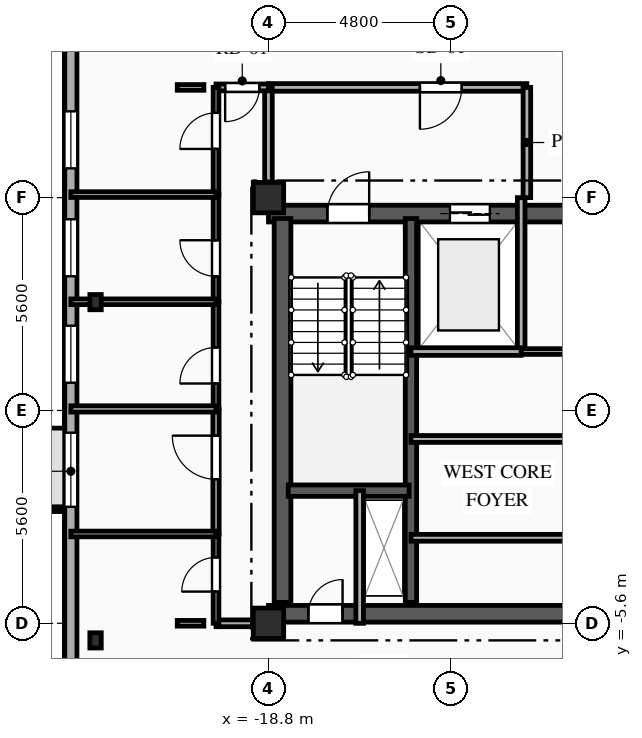
"""IFC4 building model, lengths in metres.
Left out: names, types, materials, properties, quantities, classifications, styles, units other than length and angle.
Written with IfcOpenShell. Run it as: python <this file> out.ifc"""

import sys

from ifc_helpers import new_model, si_unit, direction, frame, frame_2d, origin, origin_2d, place, context, subcontext, project, spatial, rectangle, i_section, extrude, element, fill, save


model = new_model("IFC4")
c1 = context("Model", 3, precision=1e-05, world=origin(), true_north=direction((0.0, 1.0)))
c2 = subcontext(c1, "Body", "Model", "MODEL_VIEW")
j1 = project(units=[si_unit("LENGTHUNIT", "METRE"), si_unit("PLANEANGLEUNIT", "RADIAN")], contexts=[c1])
p1 = place(None, origin())
s1 = spatial("IfcSite", under=j1, at=p1, CompositionType="ELEMENT")
p2 = place(p1, origin())
s2 = spatial("IfcBuilding", under=s1, at=p2, CompositionType="ELEMENT")
p3 = place(p2, frame((0.0, 0.0, 241.7)))
s3 = spatial("IfcBuildingStorey", under=s2, at=p3, CompositionType="ELEMENT", Elevation=241.7)
for number, where, z_axis, x_axis in (
    (1, (-18.8, -5.6, 0.0), (0.0, 0.0, 1.0), (1.0, 0.0, 0.0)),
    (2, (-18.8, 5.6, 0.0), (0.0, 0.0, 1.0), (1.0, 0.0, 0.0)),
):
    element("IfcColumn", number, at=place(p3, frame(where, z_axis=z_axis, x_axis=x_axis)), inside=s3, PredefinedType="COLUMN", context=c2, shape_type="SweptSolid", body=[
        extrude(rectangle(XDim=0.8, YDim=0.8, at=origin_2d()), origin(), (0.0, 0.0, 1.0), 3.35),
    ])
for number, where, z_axis, x_axis in (
    (3, (-23.35, 2.85, 0.0), (0.0, 0.0, 1.0), (1.0, 0.0, 0.0)),
    (4, (-23.35, -6.05, 0.0), (0.0, 0.0, 1.0), (1.0, 0.0, 0.0)),
):
    element("IfcColumn", number, at=place(p3, frame(where, z_axis=z_axis, x_axis=x_axis)), inside=s3, PredefinedType="COLUMN", context=c2, shape_type="SweptSolid", body=[
        extrude(i_section(OverallWidth=0.3, OverallDepth=0.4, WebThickness=0.013, FlangeThickness=0.024, FilletRadius=0.027, at=origin_2d()), origin(), (0.0, 0.0, 1.0), 3.35),
    ])
p4 = place(p3, frame((-24.0, -15.6, 0.0), z_axis=(0.0, 0.0, 1.0), x_axis=(0.0, 1.0, 0.0)))
e5 = element("IfcWall", 5, at=p4, inside=s3, PredefinedType="SOLIDWALL", context=c2, shape_type="SweptSolid", body=[
    extrude(rectangle(XDim=28.0, YDim=0.32, at=frame_2d((14.0, 0.0))), origin(), (0.0, 0.0, 1.0), 3.04),
])
p5 = place(p4, frame((13.065, 0.0, 0.85)))
e6 = element("IfcOpeningElement", 6, at=p5, cuts=e5, PredefinedType="OPENING", context=c2, shape_type="SweptSolid", body=[
    extrude(rectangle(XDim=1.95, YDim=1.85, at=frame_2d((0.975, 0.925))), frame((0.0, 0.17, 0.0), z_axis=(0.0, -1.0, 0.0), x_axis=(1.0, 0.0, 0.0)), (0.0, 0.0, 1.0), 0.34),
])
p6 = place(p4, frame((16.33, 0.0, 0.85)))
e7 = element("IfcOpeningElement", 7, at=p6, cuts=e5, PredefinedType="OPENING", context=c2, shape_type="SweptSolid", body=[
    extrude(rectangle(XDim=1.5, YDim=1.85, at=frame_2d((0.75, 0.925))), frame((0.0, 0.17, 0.0), z_axis=(0.0, -1.0, 0.0), x_axis=(1.0, 0.0, 0.0)), (0.0, 0.0, 1.0), 0.34),
])
p7 = place(p4, frame((19.13, 0.0, 0.85)))
e8 = element("IfcOpeningElement", 8, at=p7, cuts=e5, PredefinedType="OPENING", context=c2, shape_type="SweptSolid", body=[
    extrude(rectangle(XDim=1.5, YDim=1.85, at=frame_2d((0.75, 0.925))), frame((0.0, 0.17, 0.0), z_axis=(0.0, -1.0, 0.0), x_axis=(1.0, 0.0, 0.0)), (0.0, 0.0, 1.0), 0.34),
])
p8 = place(p4, frame((21.97, 0.0, 0.85)))
e9 = element("IfcOpeningElement", 9, at=p8, cuts=e5, PredefinedType="OPENING", context=c2, shape_type="SweptSolid", body=[
    extrude(rectangle(XDim=1.5, YDim=1.85, at=frame_2d((0.75, 0.925))), frame((0.0, 0.17, 0.0), z_axis=(0.0, -1.0, 0.0), x_axis=(1.0, 0.0, 0.0)), (0.0, 0.0, 1.0), 0.34),
])
p9 = place(p3, frame((-18.8, 5.18, 0.0), z_axis=(0.0, 0.0, 1.0), x_axis=(1.0, 0.0, 0.0)))
e10 = element("IfcWall", 10, at=p9, inside=s3, PredefinedType="SHEAR", context=c2, shape_type="SweptSolid", body=[
    extrude(rectangle(XDim=9.6, YDim=0.44, at=frame_2d((4.8, 0.0))), origin(), (0.0, 0.0, 1.0), 3.04),
])
p10 = place(p9, frame((1.55, 0.0, 0.0)))
e11 = element("IfcOpeningElement", 11, at=p10, cuts=e10, PredefinedType="OPENING", context=c2, shape_type="SweptSolid", body=[
    extrude(rectangle(XDim=1.1, YDim=2.15, at=frame_2d((0.55, 1.075))), frame((0.0, 0.23, 0.0), z_axis=(0.0, -1.0, 0.0), x_axis=(1.0, 0.0, 0.0)), (0.0, 0.0, 1.0), 0.46),
])
p11 = place(p9, frame((4.775, 0.0, 0.0)))
e12 = element("IfcOpeningElement", 12, at=p11, cuts=e10, PredefinedType="OPENING", context=c2, shape_type="SweptSolid", body=[
    extrude(rectangle(XDim=1.05, YDim=2.1, at=frame_2d((0.525, 1.05))), frame((0.0, 0.23, 0.0), z_axis=(0.0, -1.0, 0.0), x_axis=(1.0, 0.0, 0.0)), (0.0, 0.0, 1.0), 0.46),
])
p12 = place(p3, frame((-18.8, -5.35, 0.0), z_axis=(0.0, 0.0, 1.0), x_axis=(1.0, 0.0, 0.0)))
e13 = element("IfcWall", 13, at=p12, inside=s3, PredefinedType="SHEAR", context=c2, shape_type="SweptSolid", body=[
    extrude(rectangle(XDim=9.6, YDim=0.44, at=frame_2d((4.8, 0.0))), origin(), (0.0, 0.0, 1.0), 3.04),
])
p13 = place(p12, frame((1.05, 0.0, 0.0)))
e14 = element("IfcOpeningElement", 14, at=p13, cuts=e13, PredefinedType="OPENING", context=c2, shape_type="SweptSolid", body=[
    extrude(rectangle(XDim=0.9, YDim=2.1, at=frame_2d((0.45, 1.05))), frame((0.0, 0.23, 0.0), z_axis=(0.0, -1.0, 0.0), x_axis=(1.0, 0.0, 0.0)), (0.0, 0.0, 1.0), 0.46),
])
p14 = place(p3, frame((-18.43, -5.05, 0.0), z_axis=(0.0, 0.0, 1.0), x_axis=(0.0, 1.0, 0.0)))
e15 = element("IfcWall", 15, at=p14, inside=s3, PredefinedType="SHEAR", context=c2, shape_type="SweptSolid", body=[
    extrude(rectangle(XDim=10.1, YDim=0.44, at=frame_2d((5.05, 0.0))), origin(), (0.0, 0.0, 1.0), 3.04),
])
p15 = place(p3, frame((-15.05, -5.05, 0.0), z_axis=(0.0, 0.0, 1.0), x_axis=(0.0, 1.0, 0.0)))
e16 = element("IfcWall", 16, at=p15, inside=s3, PredefinedType="SHEAR", context=c2, shape_type="SweptSolid", body=[
    extrude(rectangle(XDim=10.1, YDim=0.3, at=frame_2d((5.05, 0.0))), origin(), (0.0, 0.0, 1.0), 3.04),
])
p16 = place(p3, frame((-18.28, -2.11, 0.0), z_axis=(0.0, 0.0, 1.0), x_axis=(1.0, 0.0, 0.0)))
e17 = element("IfcWall", 17, at=p16, inside=s3, PredefinedType="SHEAR", context=c2, shape_type="SweptSolid", body=[
    extrude(rectangle(XDim=3.18, YDim=0.3, at=frame_2d((1.59, 0.0))), origin(), (0.0, 0.0, 1.0), 3.04),
])
p17 = place(p3, frame((-16.4, -5.6, 0.0), z_axis=(0.0, 0.0, 1.0), x_axis=(0.0, 1.0, 0.0)))
e18 = element("IfcWall", 18, at=p17, inside=s3, PredefinedType="PARTITIONING", context=c2, shape_type="SweptSolid", body=[
    extrude(rectangle(XDim=3.49, YDim=0.2, at=frame_2d((1.745, 0.0))), origin(), (0.0, 0.0, 1.0), 3.04),
])
p18 = place(p3, frame((-12.15, 1.55, 0.0), z_axis=(0.0, 0.0, 1.0), x_axis=(0.0, 1.0, 0.0)))
e19 = element("IfcWall", 19, at=p18, inside=s3, PredefinedType="PARTITIONING", context=c2, shape_type="SweptSolid", body=[
    extrude(rectangle(XDim=4.05, YDim=0.2, at=frame_2d((2.025, 0.0))), origin(), (0.0, 0.0, 1.0), 3.04),
])
p19 = place(p3, frame((-12.0, 8.5, 0.0), z_axis=(0.0, 0.0, 1.0), x_axis=(-1.0, 0.0, 0.0)))
e20 = element("IfcWall", 20, at=p19, inside=s3, PredefinedType="PARTITIONING", context=c2, shape_type="SweptSolid", body=[
    extrude(rectangle(XDim=6.8, YDim=0.2, at=frame_2d((3.4, 0.0))), origin(), (0.0, 0.0, 1.0), 3.04),
])
p20 = place(p19, frame((1.715, 0.0, 0.0)))
e21 = element("IfcOpeningElement", 21, at=p20, cuts=e20, PredefinedType="OPENING", context=c2, shape_type="SweptSolid", body=[
    extrude(rectangle(XDim=1.1, YDim=2.15, at=frame_2d((0.55, 1.075))), frame((0.0, 0.11, 0.0), z_axis=(0.0, -1.0, 0.0), x_axis=(1.0, 0.0, 0.0)), (0.0, 0.0, 1.0), 0.22),
])
p21 = place(p3, frame((-12.0, 5.6, 0.0), z_axis=(0.0, 0.0, 1.0), x_axis=(0.0, 1.0, 0.0)))
e22 = element("IfcWall", 22, at=p21, inside=s3, PredefinedType="PARTITIONING", context=c2, shape_type="SweptSolid", body=[
    extrude(rectangle(XDim=2.9, YDim=0.2, at=frame_2d((1.45, 0.0))), origin(), (0.0, 0.0, 1.0), 3.04),
])
p22 = place(p3, frame((-18.8, 8.5, 0.0), z_axis=(0.0, 0.0, 1.0), x_axis=(0.0, -1.0, 0.0)))
e23 = element("IfcWall", 23, at=p22, inside=s3, PredefinedType="PARTITIONING", context=c2, shape_type="SweptSolid", body=[
    extrude(rectangle(XDim=2.9, YDim=0.2, at=frame_2d((1.45, 0.0))), origin(), (0.0, 0.0, 1.0), 2.665),
])
p23 = place(p3, frame((-12.15, 1.55, 0.0), z_axis=(0.0, 0.0, 1.0), x_axis=(1.0, 0.0, 0.0)))
e24 = element("IfcWall", 24, at=p23, inside=s3, PredefinedType="PARTITIONING", context=c2, shape_type="SweptSolid", body=[
    extrude(rectangle(XDim=2.95, YDim=0.15, at=frame_2d((1.475, 0.0))), origin(), (0.0, 0.0, 1.0), 3.04),
])
p24 = place(p3, frame((-15.05, -3.35, 0.0), z_axis=(0.0, 0.0, 1.0), x_axis=(1.0, 0.0, 0.0)))
e25 = element("IfcWall", 25, at=p24, inside=s3, PredefinedType="PARTITIONING", context=c2, shape_type="SweptSolid", body=[
    extrude(rectangle(XDim=5.85, YDim=0.18, at=frame_2d((2.925, 0.0))), origin(), (0.0, 0.0, 1.0), 2.755),
])
p25 = place(p3, frame((-9.2, -0.75, 0.0), z_axis=(0.0, 0.0, 1.0), x_axis=(-1.0, 0.0, 0.0)))
e26 = element("IfcWall", 26, at=p25, inside=s3, PredefinedType="PARTITIONING", context=c2, shape_type="SweptSolid", body=[
    extrude(rectangle(XDim=5.85, YDim=0.18, at=frame_2d((2.925, 0.0))), origin(), (0.0, 0.0, 1.0), 3.04),
])
p26 = place(p3, frame((-18.8, 8.5, 0.0), z_axis=(0.0, 0.0, 1.0), x_axis=(-1.0, 0.0, 0.0)))
e27 = element("IfcWall", 27, at=p26, inside=s3, PredefinedType="PARTITIONING", context=c2, shape_type="SweptSolid", body=[
    extrude(rectangle(XDim=1.38, YDim=0.18, at=frame_2d((0.69, 0.0))), origin(), (0.0, 0.0, 1.0), 3.04),
])
p27 = place(p26, frame((0.24, 0.0, 0.0)))
e28 = element("IfcOpeningElement", 28, at=p27, cuts=e27, PredefinedType="OPENING", context=c2, shape_type="SweptSolid", body=[
    extrude(rectangle(XDim=0.9, YDim=2.1, at=frame_2d((0.45, 1.05))), frame((0.0, 0.1, 0.0), z_axis=(0.0, -1.0, 0.0), x_axis=(1.0, 0.0, 0.0)), (0.0, 0.0, 1.0), 0.2),
])
p28 = place(p3, frame((-20.5, 8.5, 0.0), z_axis=(0.0, 0.0, 1.0), x_axis=(-1.0, 0.0, 0.0)))
e29 = element("IfcWall", 29, at=p28, inside=s3, PredefinedType="PARTITIONING", context=c2, shape_type="SweptSolid", body=[
    extrude(rectangle(XDim=0.7, YDim=0.15, at=frame_2d((0.35, 0.0))), origin(), (0.0, 0.0, 1.0), 3.04),
])
p29 = place(p3, frame((-20.18, -5.6, 0.0), z_axis=(0.0, 0.0, 1.0), x_axis=(1.0, 0.0, 0.0)))
e30 = element("IfcWall", 30, at=p29, inside=s3, PredefinedType="PARTITIONING", context=c2, shape_type="SweptSolid", body=[
    extrude(rectangle(XDim=1.38, YDim=0.18, at=frame_2d((0.69, 0.0))), origin(), (0.0, 0.0, 1.0), 3.04),
])
p30 = place(p3, frame((-21.2, -5.6, 0.0), z_axis=(0.0, 0.0, 1.0), x_axis=(1.0, 0.0, 0.0)))
e31 = element("IfcWall", 31, at=p30, inside=s3, PredefinedType="PLUMBINGWALL", context=c2, shape_type="SweptSolid", body=[
    extrude(rectangle(XDim=0.7, YDim=0.15, at=frame_2d((0.35, 0.0))), origin(), (0.0, 0.0, 1.0), 3.04),
])
p31 = place(p3, frame((-20.18, -5.6, 0.0), z_axis=(0.0, 0.0, 1.0), x_axis=(0.0, 1.0, 0.0)))
e32 = element("IfcWall", 32, at=p31, inside=s3, PredefinedType="PLUMBINGWALL", context=c2, shape_type="SweptSolid", body=[
    extrude(rectangle(XDim=2.35, YDim=0.15, at=frame_2d((1.175, 0.0))), origin(), (0.0, 0.0, 1.0), 3.04),
])
p32 = place(p31, frame((0.834, 0.0, 0.0)))
e33 = element("IfcOpeningElement", 33, at=p32, cuts=e32, PredefinedType="OPENING", context=c2, shape_type="SweptSolid", body=[
    extrude(rectangle(XDim=0.9, YDim=2.1, at=frame_2d((0.45, 1.05))), frame((0.0, 0.085, 0.0), z_axis=(0.0, -1.0, 0.0), x_axis=(1.0, 0.0, 0.0)), (0.0, 0.0, 1.0), 0.17),
])
p33 = place(p3, frame((-20.18, -3.25, 0.0), z_axis=(0.0, 0.0, 1.0), x_axis=(0.0, 1.0, 0.0)))
e34 = element("IfcWall", 34, at=p33, inside=s3, PredefinedType="PARTITIONING", context=c2, shape_type="SweptSolid", body=[
    extrude(rectangle(XDim=3.29, YDim=0.165, at=frame_2d((1.645, 0.0))), origin(), (0.0, 0.0, 1.0), 3.04),
])
p34 = place(p33, frame((1.438, 0.0, 0.0)))
e35 = element("IfcOpeningElement", 35, at=p34, cuts=e34, PredefinedType="OPENING", context=c2, shape_type="SweptSolid", body=[
    extrude(rectangle(XDim=1.15, YDim=2.15, at=frame_2d((0.575, 1.075))), frame((0.0, 0.093, 0.0), z_axis=(0.0, -1.0, 0.0), x_axis=(1.0, 0.0, 0.0)), (0.0, 0.0, 1.0), 0.185),
])
p35 = place(p3, frame((-20.18, 0.04, 0.0), z_axis=(0.0, 0.0, 1.0), x_axis=(0.0, 1.0, 0.0)))
e36 = element("IfcWall", 36, at=p35, inside=s3, PredefinedType="PARTITIONING", context=c2, shape_type="SweptSolid", body=[
    extrude(rectangle(XDim=2.82, YDim=0.15, at=frame_2d((1.41, 0.0))), origin(), (0.0, 0.0, 1.0), 3.04),
])
p36 = place(p35, frame((0.669, 0.0, 0.0)))
e37 = element("IfcOpeningElement", 37, at=p36, cuts=e36, PredefinedType="OPENING", context=c2, shape_type="SweptSolid", body=[
    extrude(rectangle(XDim=0.95, YDim=2.1, at=frame_2d((0.475, 1.05))), frame((0.0, 0.085, 0.0), z_axis=(0.0, -1.0, 0.0), x_axis=(1.0, 0.0, 0.0)), (0.0, 0.0, 1.0), 0.17),
])
p37 = place(p3, frame((-20.18, 2.86, 0.0), z_axis=(0.0, 0.0, 1.0), x_axis=(0.0, 1.0, 0.0)))
e38 = element("IfcWall", 38, at=p37, inside=s3, PredefinedType="PARTITIONING", context=c2, shape_type="SweptSolid", body=[
    extrude(rectangle(XDim=2.82, YDim=0.15, at=frame_2d((1.41, 0.0))), origin(), (0.0, 0.0, 1.0), 3.04),
])
p38 = place(p37, frame((0.669, 0.0, 0.0)))
e39 = element("IfcOpeningElement", 39, at=p38, cuts=e38, PredefinedType="OPENING", context=c2, shape_type="SweptSolid", body=[
    extrude(rectangle(XDim=0.95, YDim=2.1, at=frame_2d((0.475, 1.05))), frame((0.0, 0.085, 0.0), z_axis=(0.0, -1.0, 0.0), x_axis=(1.0, 0.0, 0.0)), (0.0, 0.0, 1.0), 0.17),
])
p39 = place(p3, frame((-20.18, 5.68, 0.0), z_axis=(0.0, 0.0, 1.0), x_axis=(0.0, 1.0, 0.0)))
e40 = element("IfcWall", 40, at=p39, inside=s3, PredefinedType="PARTITIONING", context=c2, shape_type="SweptSolid", body=[
    extrude(rectangle(XDim=2.82, YDim=0.15, at=frame_2d((1.41, 0.0))), origin(), (0.0, 0.0, 1.0), 3.04),
])
p40 = place(p39, frame((1.201, 0.0, 0.0)))
e41 = element("IfcOpeningElement", 41, at=p40, cuts=e40, PredefinedType="OPENING", context=c2, shape_type="SweptSolid", body=[
    extrude(rectangle(XDim=0.95, YDim=2.1, at=frame_2d((0.475, 1.05))), frame((0.0, 0.085, 0.0), z_axis=(0.0, -1.0, 0.0), x_axis=(1.0, 0.0, 0.0)), (0.0, 0.0, 1.0), 0.17),
])
p41 = place(p3, frame((-24.0, -3.25, 0.0), z_axis=(0.0, 0.0, 1.0), x_axis=(1.0, 0.0, 0.0)))
e42 = element("IfcWall", 42, at=p41, inside=s3, PredefinedType="PLUMBINGWALL", context=c2, shape_type="SweptSolid", body=[
    extrude(rectangle(XDim=3.82, YDim=0.15, at=frame_2d((1.91, 0.0))), origin(), (0.0, 0.0, 1.0), 3.04),
])
p42 = place(p3, frame((-24.0, 0.04, 0.0), z_axis=(0.0, 0.0, 1.0), x_axis=(1.0, 0.0, 0.0)))
e43 = element("IfcWall", 43, at=p42, inside=s3, PredefinedType="PARTITIONING", context=c2, shape_type="SweptSolid", body=[
    extrude(rectangle(XDim=3.82, YDim=0.165, at=frame_2d((1.91, 0.0))), origin(), (0.0, 0.0, 1.0), 3.04),
])
p43 = place(p3, frame((-24.0, 2.86, 0.0), z_axis=(0.0, 0.0, 1.0), x_axis=(1.0, 0.0, 0.0)))
e44 = element("IfcWall", 44, at=p43, inside=s3, PredefinedType="PARTITIONING", context=c2, shape_type="SweptSolid", body=[
    extrude(rectangle(XDim=3.82, YDim=0.15, at=frame_2d((1.91, 0.0))), origin(), (0.0, 0.0, 1.0), 2.665),
])
p44 = place(p3, frame((-24.0, 5.68, 0.0), z_axis=(0.0, 0.0, 1.0), x_axis=(1.0, 0.0, 0.0)))
e45 = element("IfcWall", 45, at=p44, inside=s3, PredefinedType="PARTITIONING", context=c2, shape_type="SweptSolid", body=[
    extrude(rectangle(XDim=3.82, YDim=0.15, at=frame_2d((1.91, 0.0))), origin(), (0.0, 0.0, 1.0), 3.04),
])
p45 = place(p3, frame((-15.05, 1.55, 0.0), z_axis=(0.0, 0.0, 1.0), x_axis=(1.0, 0.0, 0.0)))
e46 = element("IfcWall", 46, at=p45, inside=s3, PredefinedType="PARTITIONING", context=c2, shape_type="SweptSolid", body=[
    extrude(rectangle(XDim=2.9, YDim=0.2, at=frame_2d((1.45, 0.0))), origin(), (0.0, 0.0, 1.0), 3.04),
])
p46 = place(p5, origin())
e47 = element("IfcWindow", 47, at=p46, inside=s3, PartitioningType="SINGLE_PANEL", PredefinedType="WINDOW", context=c2, shape_type="SweptSolid", body=[
    extrude(rectangle(XDim=1.95, YDim=1.85, at=frame_2d((0.975, 0.925))), frame((0.0, 0.03, 0.0), z_axis=(0.0, -1.0, 0.0), x_axis=(1.0, 0.0, 0.0)), (0.0, 0.0, 1.0), 0.06),
])
fill(e6, e47)
p47 = place(p6, origin())
e48 = element("IfcWindow", 48, at=p47, inside=s3, PartitioningType="SINGLE_PANEL", PredefinedType="WINDOW", context=c2, shape_type="SweptSolid", body=[
    extrude(rectangle(XDim=1.5, YDim=1.85, at=frame_2d((0.75, 0.925))), frame((0.0, 0.03, 0.0), z_axis=(0.0, -1.0, 0.0), x_axis=(1.0, 0.0, 0.0)), (0.0, 0.0, 1.0), 0.06),
])
fill(e7, e48)
p48 = place(p7, origin())
e49 = element("IfcWindow", 49, at=p48, inside=s3, PartitioningType="SINGLE_PANEL", PredefinedType="WINDOW", context=c2, shape_type="SweptSolid", body=[
    extrude(rectangle(XDim=1.5, YDim=1.85, at=frame_2d((0.75, 0.925))), frame((0.0, 0.03, 0.0), z_axis=(0.0, -1.0, 0.0), x_axis=(1.0, 0.0, 0.0)), (0.0, 0.0, 1.0), 0.06),
])
fill(e8, e49)
p49 = place(p8, origin())
e50 = element("IfcWindow", 50, at=p49, inside=s3, PartitioningType="SINGLE_PANEL", PredefinedType="WINDOW", context=c2, shape_type="SweptSolid", body=[
    extrude(rectangle(XDim=1.5, YDim=1.85, at=frame_2d((0.75, 0.925))), frame((0.0, 0.03, 0.0), z_axis=(0.0, -1.0, 0.0), x_axis=(1.0, 0.0, 0.0)), (0.0, 0.0, 1.0), 0.06),
])
fill(e9, e50)
p50 = place(p10, origin())
e51 = element("IfcDoor", 51, at=p50, inside=s3, OperationType="SINGLE_SWING_RIGHT", PredefinedType="DOOR", context=c2, shape_type="SweptSolid", body=[
    extrude(rectangle(XDim=1.1, YDim=2.15, at=frame_2d((0.55, 1.075))), frame((0.0, 0.025, 0.0), z_axis=(0.0, -1.0, 0.0), x_axis=(1.0, 0.0, 0.0)), (0.0, 0.0, 1.0), 0.05),
])
fill(e11, e51)
p51 = place(p11, origin())
e52 = element("IfcDoor", 52, at=p51, inside=s3, OperationType="DOUBLE_DOOR_SLIDING", PredefinedType="DOOR", context=c2, shape_type="SweptSolid", body=[
    extrude(rectangle(XDim=1.05, YDim=2.1, at=frame_2d((0.525, 1.05))), frame((0.0, 0.025, 0.0), z_axis=(0.0, -1.0, 0.0), x_axis=(1.0, 0.0, 0.0)), (0.0, 0.0, 1.0), 0.05),
])
fill(e12, e52)
p52 = place(p13, origin())
e53 = element("IfcDoor", 53, at=p52, inside=s3, OperationType="SINGLE_SWING_RIGHT", PredefinedType="DOOR", context=c2, shape_type="SweptSolid", body=[
    extrude(rectangle(XDim=0.9, YDim=2.1, at=frame_2d((0.45, 1.05))), frame((0.0, 0.025, 0.0), z_axis=(0.0, -1.0, 0.0), x_axis=(1.0, 0.0, 0.0)), (0.0, 0.0, 1.0), 0.05),
])
fill(e14, e53)
p53 = place(p20, origin())
e54 = element("IfcDoor", 54, at=p53, inside=s3, OperationType="SINGLE_SWING_RIGHT", PredefinedType="DOOR", context=c2, shape_type="SweptSolid", body=[
    extrude(rectangle(XDim=1.1, YDim=2.15, at=frame_2d((0.55, 1.075))), frame((0.0, 0.025, 0.0), z_axis=(0.0, -1.0, 0.0), x_axis=(1.0, 0.0, 0.0)), (0.0, 0.0, 1.0), 0.05),
])
fill(e21, e54)
p54 = place(p27, origin())
e55 = element("IfcDoor", 55, at=p54, inside=s3, OperationType="SINGLE_SWING_RIGHT", PredefinedType="DOOR", context=c2, shape_type="SweptSolid", body=[
    extrude(rectangle(XDim=0.9, YDim=2.1, at=frame_2d((0.45, 1.05))), frame((0.0, 0.025, 0.0), z_axis=(0.0, -1.0, 0.0), x_axis=(1.0, 0.0, 0.0)), (0.0, 0.0, 1.0), 0.05),
])
fill(e28, e55)
p55 = place(p32, origin())
e56 = element("IfcDoor", 56, at=p55, inside=s3, OperationType="SINGLE_SWING_LEFT", PredefinedType="DOOR", context=c2, shape_type="SweptSolid", body=[
    extrude(rectangle(XDim=0.9, YDim=2.1, at=frame_2d((0.45, 1.05))), frame((0.0, 0.025, 0.0), z_axis=(0.0, -1.0, 0.0), x_axis=(1.0, 0.0, 0.0)), (0.0, 0.0, 1.0), 0.05),
])
fill(e33, e56)
p56 = place(p34, origin())
e57 = element("IfcDoor", 57, at=p56, inside=s3, OperationType="SINGLE_SWING_RIGHT", PredefinedType="DOOR", context=c2, shape_type="SweptSolid", body=[
    extrude(rectangle(XDim=1.15, YDim=2.15, at=frame_2d((0.575, 1.075))), frame((0.0, 0.025, 0.0), z_axis=(0.0, -1.0, 0.0), x_axis=(1.0, 0.0, 0.0)), (0.0, 0.0, 1.0), 0.05),
])
fill(e35, e57)
p57 = place(p36, origin())
e58 = element("IfcDoor", 58, at=p57, inside=s3, OperationType="SINGLE_SWING_LEFT", PredefinedType="DOOR", context=c2, shape_type="SweptSolid", body=[
    extrude(rectangle(XDim=0.95, YDim=2.1, at=frame_2d((0.475, 1.05))), frame((0.0, 0.025, 0.0), z_axis=(0.0, -1.0, 0.0), x_axis=(1.0, 0.0, 0.0)), (0.0, 0.0, 1.0), 0.05),
])
fill(e37, e58)
p58 = place(p38, origin())
e59 = element("IfcDoor", 59, at=p58, inside=s3, OperationType="SINGLE_SWING_RIGHT", PredefinedType="DOOR", context=c2, shape_type="SweptSolid", body=[
    extrude(rectangle(XDim=0.95, YDim=2.1, at=frame_2d((0.475, 1.05))), frame((0.0, 0.025, 0.0), z_axis=(0.0, -1.0, 0.0), x_axis=(1.0, 0.0, 0.0)), (0.0, 0.0, 1.0), 0.05),
])
fill(e39, e59)
p59 = place(p40, origin())
e60 = element("IfcDoor", 60, at=p59, inside=s3, OperationType="SINGLE_SWING_LEFT", PredefinedType="DOOR", context=c2, shape_type="SweptSolid", body=[
    extrude(rectangle(XDim=0.95, YDim=2.1, at=frame_2d((0.475, 1.05))), frame((0.0, 0.025, 0.0), z_axis=(0.0, -1.0, 0.0), x_axis=(1.0, 0.0, 0.0)), (0.0, 0.0, 1.0), 0.05),
])
fill(e41, e60)
save(model, sys.argv[1])
